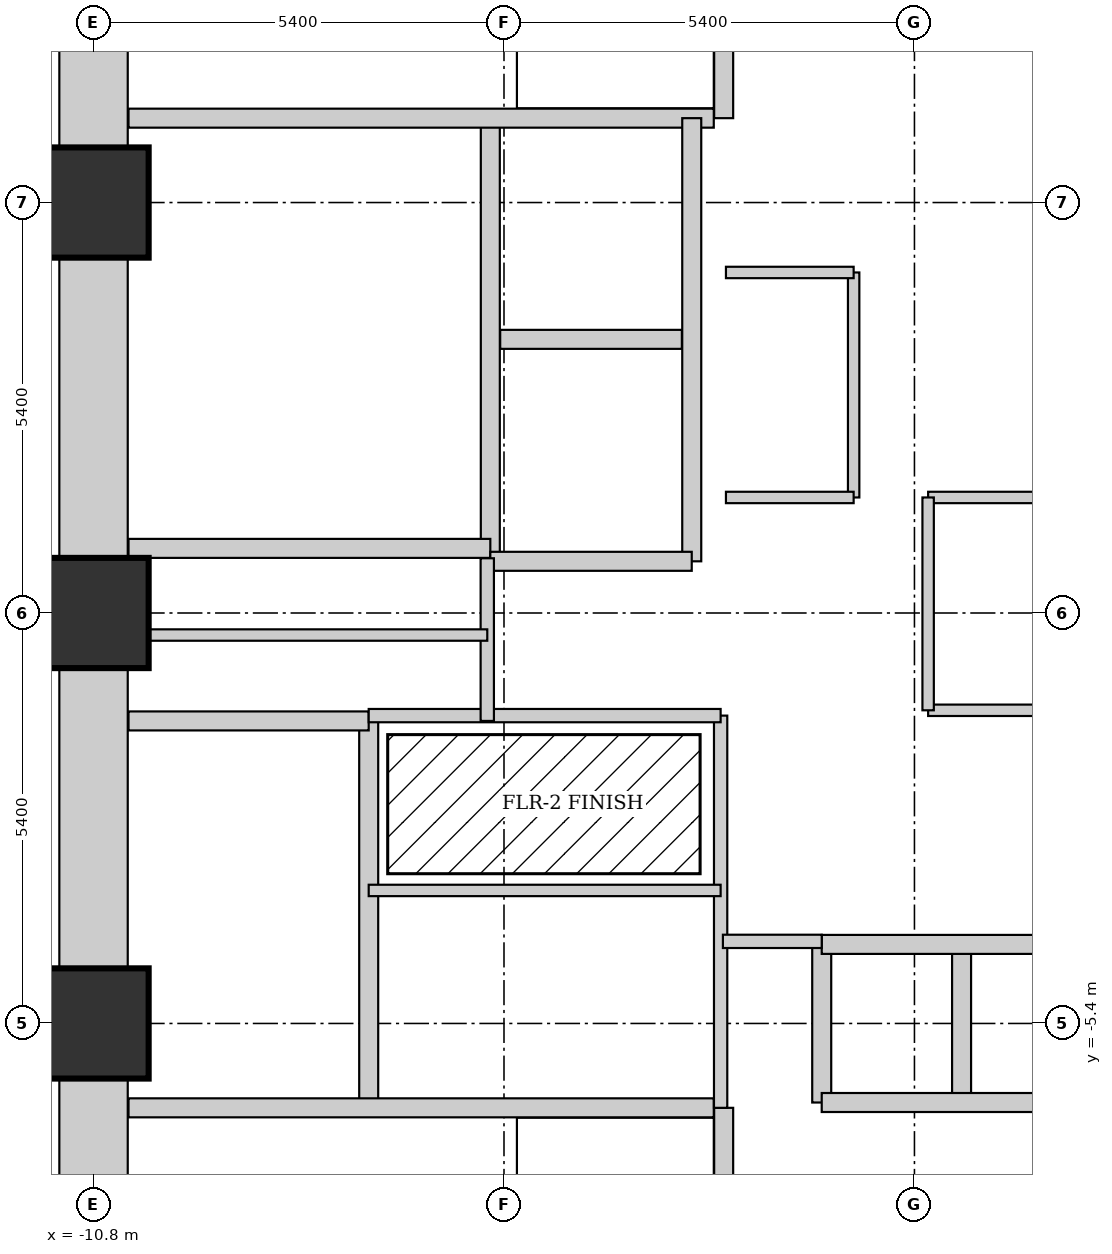
"""IFC4 building model, lengths in metres.
Left out: names, types, materials, properties, quantities, classifications, styles, units other than length and angle.
Written with IfcOpenShell. Run it as: python <this file> out.ifc"""

import sys

from ifc_helpers import new_model, si_unit, direction, frame, frame_2d, origin, origin_2d, place, context, subcontext, project, spatial, rectangle, extrude, element, fill, save


model = new_model("IFC4")
c1 = context("Model", 3, precision=1e-05, world=origin(), true_north=direction((0.0, 1.0)))
c2 = subcontext(c1, "Body", "Model", "MODEL_VIEW")
j1 = project(units=[si_unit("LENGTHUNIT", "METRE"), si_unit("PLANEANGLEUNIT", "RADIAN")], contexts=[c1])
p1 = place(None, origin())
s1 = spatial("IfcSite", under=j1, at=p1, CompositionType="ELEMENT")
p2 = place(p1, origin())
s2 = spatial("IfcBuilding", under=s1, at=p2, CompositionType="ELEMENT")
p3 = place(p2, frame((0.0, 0.0, 9.0)))
s3 = spatial("IfcBuildingStorey", under=s2, at=p3, CompositionType="ELEMENT", Elevation=9.0)
for number, where, z_axis, x_axis in (
    (1, (-10.8, -5.4, 0.0), (0.0, 0.0, 1.0), (1.0, 0.0, 0.0)),
    (2, (-10.8, 0.0, 0.0), (0.0, 0.0, 1.0), (1.0, 0.0, 0.0)),
    (3, (-10.8, 5.4, 0.0), (0.0, 0.0, 1.0), (1.0, 0.0, 0.0)),
):
    element("IfcColumn", number, at=place(p3, frame(where, z_axis=z_axis, x_axis=x_axis)), inside=s3, PredefinedType="COLUMN", context=c2, shape_type="SweptSolid", body=[
        extrude(rectangle(XDim=1.45, YDim=1.45, at=origin_2d()), origin(), (0.0, 0.0, 1.0), 4.5),
    ])
p4 = place(p3, frame((-10.8, -10.065, 0.0), z_axis=(0.0, 0.0, 1.0), x_axis=(0.0, 1.0, 0.0)))
e4 = element("IfcWall", 4, at=p4, inside=s3, PredefinedType="SHEAR", context=c2, shape_type="SweptSolid", body=[
    extrude(rectangle(XDim=3.93, YDim=0.9, at=frame_2d((1.965, 0.0))), origin(), (0.0, 0.0, 1.0), 4.5),
])
p5 = place(p3, frame((-10.8, -4.665, 0.0), z_axis=(0.0, 0.0, 1.0), x_axis=(0.0, 1.0, 0.0)))
e5 = element("IfcWall", 5, at=p5, inside=s3, PredefinedType="SHEAR", context=c2, shape_type="SweptSolid", body=[
    extrude(rectangle(XDim=3.93, YDim=0.9, at=frame_2d((1.965, 0.0))), origin(), (0.0, 0.0, 1.0), 4.5),
])
p6 = place(p5, frame((1.415, 0.0, 0.0)))
e6 = element("IfcOpeningElement", 6, at=p6, cuts=e5, PredefinedType="OPENING", context=c2, shape_type="SweptSolid", body=[
    extrude(rectangle(XDim=1.1, YDim=2.1, at=frame_2d((0.55, 1.05))), frame((0.0, 0.46, 0.0), z_axis=(0.0, -1.0, 0.0), x_axis=(1.0, 0.0, 0.0)), (0.0, 0.0, 1.0), 0.92),
])
p7 = place(p3, frame((-10.8, 0.735, 0.0), z_axis=(0.0, 0.0, 1.0), x_axis=(0.0, 1.0, 0.0)))
e7 = element("IfcWall", 7, at=p7, inside=s3, PredefinedType="SHEAR", context=c2, shape_type="SweptSolid", body=[
    extrude(rectangle(XDim=3.93, YDim=0.9, at=frame_2d((1.965, 0.0))), origin(), (0.0, 0.0, 1.0), 4.5),
])
p8 = place(p7, frame((1.415, 0.0, 0.0)))
e8 = element("IfcOpeningElement", 8, at=p8, cuts=e7, PredefinedType="OPENING", context=c2, shape_type="SweptSolid", body=[
    extrude(rectangle(XDim=1.1, YDim=2.1, at=frame_2d((0.55, 1.05))), frame((0.0, 0.46, 0.0), z_axis=(0.0, -1.0, 0.0), x_axis=(1.0, 0.0, 0.0)), (0.0, 0.0, 1.0), 0.92),
])
p9 = place(p3, frame((-10.8, 6.135, 0.0), z_axis=(0.0, 0.0, 1.0), x_axis=(0.0, 1.0, 0.0)))
e9 = element("IfcWall", 9, at=p9, inside=s3, PredefinedType="SHEAR", context=c2, shape_type="SweptSolid", body=[
    extrude(rectangle(XDim=3.93, YDim=0.9, at=frame_2d((1.965, 0.0))), origin(), (0.0, 0.0, 1.0), 4.5),
])
p10 = place(p3, frame((-5.58, 0.72, 0.0), z_axis=(0.0, 0.0, 1.0), x_axis=(0.0, 1.0, 0.0)))
e10 = element("IfcWall", 10, at=p10, inside=s3, PredefinedType="SHEAR", context=c2, shape_type="SweptSolid", body=[
    extrude(rectangle(XDim=5.79, YDim=0.25, at=frame_2d((2.895, 0.0))), origin(), (0.0, 0.0, 1.0), 4.5),
])
p11 = place(p10, frame((3.35, 0.0, 0.0)))
e11 = element("IfcOpeningElement", 11, at=p11, cuts=e10, PredefinedType="OPENING", context=c2, shape_type="SweptSolid", body=[
    extrude(rectangle(XDim=1.1, YDim=2.1, at=frame_2d((0.55, 1.05))), frame((0.0, 0.135, 0.0), z_axis=(0.0, -1.0, 0.0), x_axis=(1.0, 0.0, 0.0)), (0.0, 0.0, 1.0), 0.27),
])
p12 = place(p3, frame((-10.34, 0.85, 0.0), z_axis=(0.0, 0.0, 1.0), x_axis=(1.0, 0.0, 0.0)))
e12 = element("IfcWall", 12, at=p12, inside=s3, PredefinedType="SHEAR", context=c2, shape_type="SweptSolid", body=[
    extrude(rectangle(XDim=4.76, YDim=0.25, at=frame_2d((2.38, 0.0))), origin(), (0.0, 0.0, 1.0), 4.5),
])
p13 = place(p12, frame((1.2, 0.0, 0.0)))
e13 = element("IfcOpeningElement", 13, at=p13, cuts=e12, PredefinedType="OPENING", context=c2, shape_type="SweptSolid", body=[
    extrude(rectangle(XDim=0.85, YDim=2.1, at=frame_2d((0.425, 1.05))), frame((0.0, 0.135, 0.0), z_axis=(0.0, -1.0, 0.0), x_axis=(1.0, 0.0, 0.0)), (0.0, 0.0, 1.0), 0.27),
])
p14 = place(p3, frame((0.62, -6.34, 0.0), z_axis=(0.0, 0.0, 1.0), x_axis=(0.0, 1.0, 0.0)))
e14 = element("IfcWall", 14, at=p14, inside=s3, PredefinedType="SHEAR", context=c2, shape_type="SweptSolid", body=[
    extrude(rectangle(XDim=1.88, YDim=0.25, at=frame_2d((0.94, 0.0))), origin(), (0.0, 0.0, 1.0), 4.5),
])
p15 = place(p3, frame((-1.22, -6.44, 0.0), z_axis=(0.0, 0.0, 1.0), x_axis=(0.0, 1.0, 0.0)))
e15 = element("IfcWall", 15, at=p15, inside=s3, PredefinedType="SHEAR", context=c2, shape_type="SweptSolid", body=[
    extrude(rectangle(XDim=2.08, YDim=0.25, at=frame_2d((1.04, 0.0))), origin(), (0.0, 0.0, 1.0), 4.5),
])
p16 = place(p3, frame((-1.22, -6.44, 0.0), z_axis=(0.0, 0.0, 1.0), x_axis=(1.0, 0.0, 0.0)))
e16 = element("IfcWall", 16, at=p16, inside=s3, PredefinedType="SHEAR", context=c2, shape_type="SweptSolid", body=[
    extrude(rectangle(XDim=3.67, YDim=0.25, at=frame_2d((1.835, 0.0))), origin(), (0.0, 0.0, 1.0), 4.5),
])
p17 = place(p3, frame((-1.22, -4.36, 0.0), z_axis=(0.0, 0.0, 1.0), x_axis=(1.0, 0.0, 0.0)))
e17 = element("IfcWall", 17, at=p17, inside=s3, PredefinedType="SHEAR", context=c2, shape_type="SweptSolid", body=[
    extrude(rectangle(XDim=4.03, YDim=0.25, at=frame_2d((2.015, 0.0))), origin(), (0.0, 0.0, 1.0), 4.5),
])
p18 = place(p3, frame((-2.51, 6.51, 0.0), z_axis=(0.0, 0.0, 1.0), x_axis=(0.0, 1.0, 0.0)))
e18 = element("IfcWall", 18, at=p18, inside=s3, PredefinedType="SHEAR", context=c2, shape_type="SweptSolid", body=[
    extrude(rectangle(XDim=3.84, YDim=0.25, at=frame_2d((1.92, 0.0))), origin(), (0.0, 0.0, 1.0), 4.5),
])
p19 = place(p3, frame((-10.34, 6.51, 0.0), z_axis=(0.0, 0.0, 1.0), x_axis=(1.0, 0.0, 0.0)))
e19 = element("IfcWall", 19, at=p19, inside=s3, PredefinedType="SHEAR", context=c2, shape_type="SweptSolid", body=[
    extrude(rectangle(XDim=7.7, YDim=0.25, at=frame_2d((3.85, 0.0))), origin(), (0.0, 0.0, 1.0), 4.5),
])
p20 = place(p19, frame((0.35, 0.0, 0.0)))
e20 = element("IfcOpeningElement", 20, at=p20, cuts=e19, PredefinedType="OPENING", context=c2, shape_type="SweptSolid", body=[
    extrude(rectangle(XDim=1.1, YDim=2.1, at=frame_2d((0.55, 1.05))), frame((0.0, 0.135, 0.0), z_axis=(0.0, -1.0, 0.0), x_axis=(1.0, 0.0, 0.0)), (0.0, 0.0, 1.0), 0.27),
])
p21 = place(p3, frame((-2.51, -10.35, 0.0), z_axis=(0.0, 0.0, 1.0), x_axis=(0.0, 1.0, 0.0)))
e21 = element("IfcWall", 21, at=p21, inside=s3, PredefinedType="SHEAR", context=c2, shape_type="SweptSolid", body=[
    extrude(rectangle(XDim=3.84, YDim=0.25, at=frame_2d((1.92, 0.0))), origin(), (0.0, 0.0, 1.0), 4.5),
])
p22 = place(p3, frame((-7.18, -6.51, 0.0), z_axis=(0.0, 0.0, 1.0), x_axis=(0.0, 1.0, 0.0)))
e22 = element("IfcWall", 22, at=p22, inside=s3, PredefinedType="SHEAR", context=c2, shape_type="SweptSolid", body=[
    extrude(rectangle(XDim=5.09, YDim=0.25, at=frame_2d((2.545, 0.0))), origin(), (0.0, 0.0, 1.0), 4.5),
])
p23 = place(p3, frame((-10.34, -1.42, 0.0), z_axis=(0.0, 0.0, 1.0), x_axis=(1.0, 0.0, 0.0)))
e23 = element("IfcWall", 23, at=p23, inside=s3, PredefinedType="SHEAR", context=c2, shape_type="SweptSolid", body=[
    extrude(rectangle(XDim=3.16, YDim=0.25, at=frame_2d((1.58, 0.0))), origin(), (0.0, 0.0, 1.0), 4.5),
])
p24 = place(p3, frame((-10.34, -6.51, 0.0), z_axis=(0.0, 0.0, 1.0), x_axis=(1.0, 0.0, 0.0)))
e24 = element("IfcWall", 24, at=p24, inside=s3, PredefinedType="SHEAR", context=c2, shape_type="SweptSolid", body=[
    extrude(rectangle(XDim=7.7, YDim=0.25, at=frame_2d((3.85, 0.0))), origin(), (0.0, 0.0, 1.0), 4.5),
])
p25 = place(p24, frame((0.35, 0.0, 0.0)))
e25 = element("IfcOpeningElement", 25, at=p25, cuts=e24, PredefinedType="OPENING", context=c2, shape_type="SweptSolid", body=[
    extrude(rectangle(XDim=1.1, YDim=2.1, at=frame_2d((0.55, 1.05))), frame((0.0, 0.135, 0.0), z_axis=(0.0, -1.0, 0.0), x_axis=(1.0, 0.0, 0.0)), (0.0, 0.0, 1.0), 0.27),
])
p26 = place(p3, frame((-2.93, 0.68, 0.0), z_axis=(0.0, 0.0, 1.0), x_axis=(0.0, 1.0, 0.0)))
e26 = element("IfcWall", 26, at=p26, inside=s3, PredefinedType="SHEAR", context=c2, shape_type="SweptSolid", body=[
    extrude(rectangle(XDim=5.83, YDim=0.25, at=frame_2d((2.915, 0.0))), origin(), (0.0, 0.0, 1.0), 4.5),
])
p27 = place(p26, frame((0.75, 0.0, 0.0)))
e27 = element("IfcOpeningElement", 27, at=p27, cuts=e26, PredefinedType="OPENING", context=c2, shape_type="SweptSolid", body=[
    extrude(rectangle(XDim=1.2, YDim=2.1, at=frame_2d((0.6, 1.05))), frame((0.0, 0.135, 0.0), z_axis=(0.0, -1.0, 0.0), x_axis=(1.0, 0.0, 0.0)), (0.0, 0.0, 1.0), 0.27),
])
p28 = place(p3, frame((-5.45, 3.6, 0.0), z_axis=(0.0, 0.0, 1.0), x_axis=(1.0, 0.0, 0.0)))
e28 = element("IfcWall", 28, at=p28, inside=s3, PredefinedType="SHEAR", context=c2, shape_type="SweptSolid", body=[
    extrude(rectangle(XDim=2.39, YDim=0.25, at=frame_2d((1.195, 0.0))), origin(), (0.0, 0.0, 1.0), 4.5),
])
p29 = place(p3, frame((-5.58, 0.68, 0.0), z_axis=(0.0, 0.0, 1.0), x_axis=(1.0, 0.0, 0.0)))
e29 = element("IfcWall", 29, at=p29, inside=s3, PredefinedType="SHEAR", context=c2, shape_type="SweptSolid", body=[
    extrude(rectangle(XDim=2.65, YDim=0.25, at=frame_2d((1.325, 0.0))), origin(), (0.0, 0.0, 1.0), 4.5),
])
for number, where, z_axis, x_axis in (
    (30, (0.18, 1.52, 0.0), (0.0, 0.0, 1.0), (1.0, 0.0, 0.0)),
    (31, (0.18, -1.28, 0.0), (0.0, 0.0, 1.0), (1.0, 0.0, 0.0)),
):
    element("IfcWall", number, at=place(p3, frame(where, z_axis=z_axis, x_axis=x_axis)), inside=s3, PredefinedType="PARTITIONING", context=c2, shape_type="SweptSolid", body=[
        extrude(rectangle(XDim=2.67, YDim=0.15, at=frame_2d((1.335, 0.0))), origin(), (0.0, 0.0, 1.0), 4.25),
    ])
p30 = place(p3, frame((0.18, -1.28, 0.0), z_axis=(0.0, 0.0, 1.0), x_axis=(0.0, 1.0, 0.0)))
e32 = element("IfcWall", 32, at=p30, inside=s3, PredefinedType="PARTITIONING", context=c2, shape_type="SweptSolid", body=[
    extrude(rectangle(XDim=2.8, YDim=0.15, at=frame_2d((1.4, 0.0))), origin(), (0.0, 0.0, 1.0), 4.25),
])
p31 = place(p30, frame((0.85, 0.0, 0.0)))
e33 = element("IfcOpeningElement", 33, at=p31, cuts=e32, PredefinedType="OPENING", context=c2, shape_type="SweptSolid", body=[
    extrude(rectangle(XDim=0.85, YDim=2.1, at=frame_2d((0.425, 1.05))), frame((0.0, 0.085, 0.0), z_axis=(0.0, -1.0, 0.0), x_axis=(1.0, 0.0, 0.0)), (0.0, 0.0, 1.0), 0.17),
])
p32 = place(p3, frame((-2.55, -6.51, 0.0), z_axis=(0.0, 0.0, 1.0), x_axis=(0.0, 1.0, 0.0)))
e34 = element("IfcWall", 34, at=p32, inside=s3, PredefinedType="PARTITIONING", context=c2, shape_type="SweptSolid", body=[
    extrude(rectangle(XDim=5.16, YDim=0.175, at=frame_2d((2.58, 0.0))), origin(), (0.0, 0.0, 1.0), 4.25),
])
p33 = place(p32, frame((3.45, 0.0, 0.0)))
e35 = element("IfcOpeningElement", 35, at=p33, cuts=e34, PredefinedType="OPENING", context=c2, shape_type="SweptSolid", body=[
    extrude(rectangle(XDim=0.85, YDim=2.1, at=frame_2d((0.425, 1.05))), frame((0.0, 0.097, 0.0), z_axis=(0.0, -1.0, 0.0), x_axis=(1.0, 0.0, 0.0)), (0.0, 0.0, 1.0), 0.195),
])
p34 = place(p3, frame((-7.18, -3.65, 0.0), z_axis=(0.0, 0.0, 1.0), x_axis=(1.0, 0.0, 0.0)))
e36 = element("IfcWall", 36, at=p34, inside=s3, PredefinedType="PARTITIONING", context=c2, shape_type="SweptSolid", body=[
    extrude(rectangle(XDim=4.63, YDim=0.15, at=frame_2d((2.315, 0.0))), origin(), (0.0, 0.0, 1.0), 4.25),
])
p35 = place(p34, frame((1.0, 0.0, 0.0)))
e37 = element("IfcOpeningElement", 37, at=p35, cuts=e36, PredefinedType="OPENING", context=c2, shape_type="SweptSolid", body=[
    extrude(rectangle(XDim=0.85, YDim=2.1, at=frame_2d((0.425, 1.05))), frame((0.0, 0.085, 0.0), z_axis=(0.0, -1.0, 0.0), x_axis=(1.0, 0.0, 0.0)), (0.0, 0.0, 1.0), 0.17),
])
p36 = place(p3, frame((-7.18, -1.35, 0.0), z_axis=(0.0, 0.0, 1.0), x_axis=(1.0, 0.0, 0.0)))
e38 = element("IfcWall", 38, at=p36, inside=s3, PredefinedType="PARTITIONING", context=c2, shape_type="SweptSolid", body=[
    extrude(rectangle(XDim=4.63, YDim=0.175, at=frame_2d((2.315, 0.0))), origin(), (0.0, 0.0, 1.0), 4.25),
])
p37 = place(p3, frame((-5.62, -1.42, 0.0), z_axis=(0.0, 0.0, 1.0), x_axis=(0.0, 1.0, 0.0)))
e39 = element("IfcWall", 39, at=p37, inside=s3, PredefinedType="PARTITIONING", context=c2, shape_type="SweptSolid", body=[
    extrude(rectangle(XDim=2.14, YDim=0.175, at=frame_2d((1.07, 0.0))), origin(), (0.0, 0.0, 1.0), 4.25),
])
p38 = place(p3, frame((-10.34, -0.29, 0.0), z_axis=(0.0, 0.0, 1.0), x_axis=(1.0, 0.0, 0.0)))
e40 = element("IfcWall", 40, at=p38, inside=s3, PredefinedType="PARTITIONING", context=c2, shape_type="SweptSolid", body=[
    extrude(rectangle(XDim=4.72, YDim=0.15, at=frame_2d((2.36, 0.0))), origin(), (0.0, 0.0, 1.0), 4.25),
])
p39 = place(p38, frame((1.8, 0.0, 0.0)))
e41 = element("IfcOpeningElement", 41, at=p39, cuts=e40, PredefinedType="OPENING", context=c2, shape_type="SweptSolid", body=[
    extrude(rectangle(XDim=0.85, YDim=2.1, at=frame_2d((0.425, 1.05))), frame((0.0, 0.085, 0.0), z_axis=(0.0, -1.0, 0.0), x_axis=(1.0, 0.0, 0.0)), (0.0, 0.0, 1.0), 0.17),
])
p40 = place(p3, frame((-2.52, -4.32, 0.0), z_axis=(0.0, 0.0, 1.0), x_axis=(1.0, 0.0, 0.0)))
e42 = element("IfcWall", 42, at=p40, inside=s3, PredefinedType="PARTITIONING", context=c2, shape_type="SweptSolid", body=[
    extrude(rectangle(XDim=1.3, YDim=0.175, at=frame_2d((0.65, 0.0))), origin(), (0.0, 0.0, 1.0), 4.25),
])
p41 = place(p40, frame((0.22, 0.0, 0.0)))
e43 = element("IfcOpeningElement", 43, at=p41, cuts=e42, PredefinedType="OPENING", context=c2, shape_type="SweptSolid", body=[
    extrude(rectangle(XDim=0.85, YDim=2.1, at=frame_2d((0.425, 1.05))), frame((0.0, 0.097, 0.0), z_axis=(0.0, -1.0, 0.0), x_axis=(1.0, 0.0, 0.0)), (0.0, 0.0, 1.0), 0.195),
])
p42 = place(p3, frame((-0.8, 1.52, 0.0), z_axis=(0.0, 0.0, 1.0), x_axis=(0.0, 1.0, 0.0)))
e44 = element("IfcWall", 44, at=p42, inside=s3, PredefinedType="PARTITIONING", context=c2, shape_type="SweptSolid", body=[
    extrude(rectangle(XDim=2.96, YDim=0.15, at=frame_2d((1.48, 0.0))), origin(), (0.0, 0.0, 1.0), 4.25),
])
p43 = place(p42, frame((0.95, 0.0, 0.0)))
e45 = element("IfcOpeningElement", 45, at=p43, cuts=e44, PredefinedType="OPENING", context=c2, shape_type="SweptSolid", body=[
    extrude(rectangle(XDim=0.85, YDim=2.1, at=frame_2d((0.425, 1.05))), frame((0.0, 0.085, 0.0), z_axis=(0.0, -1.0, 0.0), x_axis=(1.0, 0.0, 0.0)), (0.0, 0.0, 1.0), 0.17),
])
for number, where, z_axis, x_axis in (
    (46, (-2.48, 4.48, 0.0), (0.0, 0.0, 1.0), (1.0, 0.0, 0.0)),
    (47, (-2.48, 1.52, 0.0), (0.0, 0.0, 1.0), (1.0, 0.0, 0.0)),
):
    element("IfcWall", number, at=place(p3, frame(where, z_axis=z_axis, x_axis=x_axis)), inside=s3, PredefinedType="PARTITIONING", context=c2, shape_type="SweptSolid", body=[
        extrude(rectangle(XDim=1.68, YDim=0.15, at=frame_2d((0.84, 0.0))), origin(), (0.0, 0.0, 1.0), 4.25),
    ])
p44 = place(p31, origin())
e48 = element("IfcDoor", 48, at=p44, inside=s3, OperationType="SINGLE_SWING_RIGHT", PredefinedType="DOOR", context=c2, shape_type="SweptSolid", body=[
    extrude(rectangle(XDim=0.85, YDim=2.1, at=frame_2d((0.425, 1.05))), frame((0.0, 0.025, 0.0), z_axis=(0.0, -1.0, 0.0), x_axis=(1.0, 0.0, 0.0)), (0.0, 0.0, 1.0), 0.05),
])
fill(e33, e48)
p45 = place(p43, origin())
e49 = element("IfcDoor", 49, at=p45, inside=s3, OperationType="SINGLE_SWING_LEFT", PredefinedType="DOOR", context=c2, shape_type="SweptSolid", body=[
    extrude(rectangle(XDim=0.85, YDim=2.1, at=frame_2d((0.425, 1.05))), frame((0.0, 0.025, 0.0), z_axis=(0.0, -1.0, 0.0), x_axis=(1.0, 0.0, 0.0)), (0.0, 0.0, 1.0), 0.05),
])
fill(e45, e49)
p46 = place(p20, origin())
e50 = element("IfcDoor", 50, at=p46, inside=s3, OperationType="SINGLE_SWING_LEFT", PredefinedType="DOOR", context=c2, shape_type="SweptSolid", body=[
    extrude(rectangle(XDim=1.1, YDim=2.1, at=frame_2d((0.55, 1.05))), frame((0.0, 0.025, 0.0), z_axis=(0.0, -1.0, 0.0), x_axis=(1.0, 0.0, 0.0)), (0.0, 0.0, 1.0), 0.05),
])
fill(e20, e50)
p47 = place(p25, origin())
e51 = element("IfcDoor", 51, at=p47, inside=s3, OperationType="SINGLE_SWING_RIGHT", PredefinedType="DOOR", context=c2, shape_type="SweptSolid", body=[
    extrude(rectangle(XDim=1.1, YDim=2.1, at=frame_2d((0.55, 1.05))), frame((0.0, 0.025, 0.0), z_axis=(0.0, -1.0, 0.0), x_axis=(1.0, 0.0, 0.0)), (0.0, 0.0, 1.0), 0.05),
])
fill(e25, e51)
p48 = place(p8, origin())
e52 = element("IfcDoor", 52, at=p48, inside=s3, OperationType="SINGLE_SWING_LEFT", PredefinedType="DOOR", context=c2, shape_type="SweptSolid", body=[
    extrude(rectangle(XDim=1.1, YDim=2.1, at=frame_2d((0.55, 1.05))), frame((0.0, 0.025, 0.0), z_axis=(0.0, -1.0, 0.0), x_axis=(1.0, 0.0, 0.0)), (0.0, 0.0, 1.0), 0.05),
])
fill(e8, e52)
p49 = place(p6, origin())
e53 = element("IfcDoor", 53, at=p49, inside=s3, OperationType="SINGLE_SWING_LEFT", PredefinedType="DOOR", context=c2, shape_type="SweptSolid", body=[
    extrude(rectangle(XDim=1.1, YDim=2.1, at=frame_2d((0.55, 1.05))), frame((0.0, 0.025, 0.0), z_axis=(0.0, -1.0, 0.0), x_axis=(1.0, 0.0, 0.0)), (0.0, 0.0, 1.0), 0.05),
])
fill(e6, e53)
p50 = place(p13, origin())
e54 = element("IfcDoor", 54, at=p50, inside=s3, OperationType="SINGLE_SWING_LEFT", PredefinedType="DOOR", context=c2, shape_type="SweptSolid", body=[
    extrude(rectangle(XDim=0.85, YDim=2.1, at=frame_2d((0.425, 1.05))), frame((0.0, 0.025, 0.0), z_axis=(0.0, -1.0, 0.0), x_axis=(1.0, 0.0, 0.0)), (0.0, 0.0, 1.0), 0.05),
])
fill(e13, e54)
p51 = place(p39, origin())
e55 = element("IfcDoor", 55, at=p51, inside=s3, OperationType="SINGLE_SWING_RIGHT", PredefinedType="DOOR", context=c2, shape_type="SweptSolid", body=[
    extrude(rectangle(XDim=0.85, YDim=2.1, at=frame_2d((0.425, 1.05))), frame((0.0, 0.025, 0.0), z_axis=(0.0, -1.0, 0.0), x_axis=(1.0, 0.0, 0.0)), (0.0, 0.0, 1.0), 0.05),
])
fill(e41, e55)
p52 = place(p11, origin())
e56 = element("IfcDoor", 56, at=p52, inside=s3, OperationType="SLIDING_TO_LEFT", PredefinedType="DOOR", context=c2, shape_type="SweptSolid", body=[
    extrude(rectangle(XDim=1.1, YDim=2.1, at=frame_2d((0.55, 1.05))), frame((0.0, 0.025, 0.0), z_axis=(0.0, -1.0, 0.0), x_axis=(1.0, 0.0, 0.0)), (0.0, 0.0, 1.0), 0.05),
])
fill(e11, e56)
p53 = place(p27, origin())
e57 = element("IfcDoor", 57, at=p53, inside=s3, OperationType="SLIDING_TO_LEFT", PredefinedType="DOOR", context=c2, shape_type="SweptSolid", body=[
    extrude(rectangle(XDim=1.2, YDim=2.1, at=frame_2d((0.6, 1.05))), frame((0.0, 0.025, 0.0), z_axis=(0.0, -1.0, 0.0), x_axis=(1.0, 0.0, 0.0)), (0.0, 0.0, 1.0), 0.05),
])
fill(e27, e57)
p54 = place(p41, origin())
e58 = element("IfcDoor", 58, at=p54, inside=s3, OperationType="SINGLE_SWING_LEFT", PredefinedType="DOOR", context=c2, shape_type="SweptSolid", body=[
    extrude(rectangle(XDim=0.85, YDim=2.1, at=frame_2d((0.425, 1.05))), frame((0.0, 0.025, 0.0), z_axis=(0.0, -1.0, 0.0), x_axis=(1.0, 0.0, 0.0)), (0.0, 0.0, 1.0), 0.05),
])
fill(e43, e58)
p55 = place(p33, origin())
e59 = element("IfcDoor", 59, at=p55, inside=s3, OperationType="SINGLE_SWING_LEFT", PredefinedType="DOOR", context=c2, shape_type="SweptSolid", body=[
    extrude(rectangle(XDim=0.85, YDim=2.1, at=frame_2d((0.425, 1.05))), frame((0.0, 0.025, 0.0), z_axis=(0.0, -1.0, 0.0), x_axis=(1.0, 0.0, 0.0)), (0.0, 0.0, 1.0), 0.05),
])
fill(e35, e59)
p56 = place(p35, origin())
e60 = element("IfcDoor", 60, at=p56, inside=s3, OperationType="SINGLE_SWING_LEFT", PredefinedType="DOOR", context=c2, shape_type="SweptSolid", body=[
    extrude(rectangle(XDim=0.85, YDim=2.1, at=frame_2d((0.425, 1.05))), frame((0.0, 0.025, 0.0), z_axis=(0.0, -1.0, 0.0), x_axis=(1.0, 0.0, 0.0)), (0.0, 0.0, 1.0), 0.05),
])
fill(e37, e60)
save(model, sys.argv[1])
